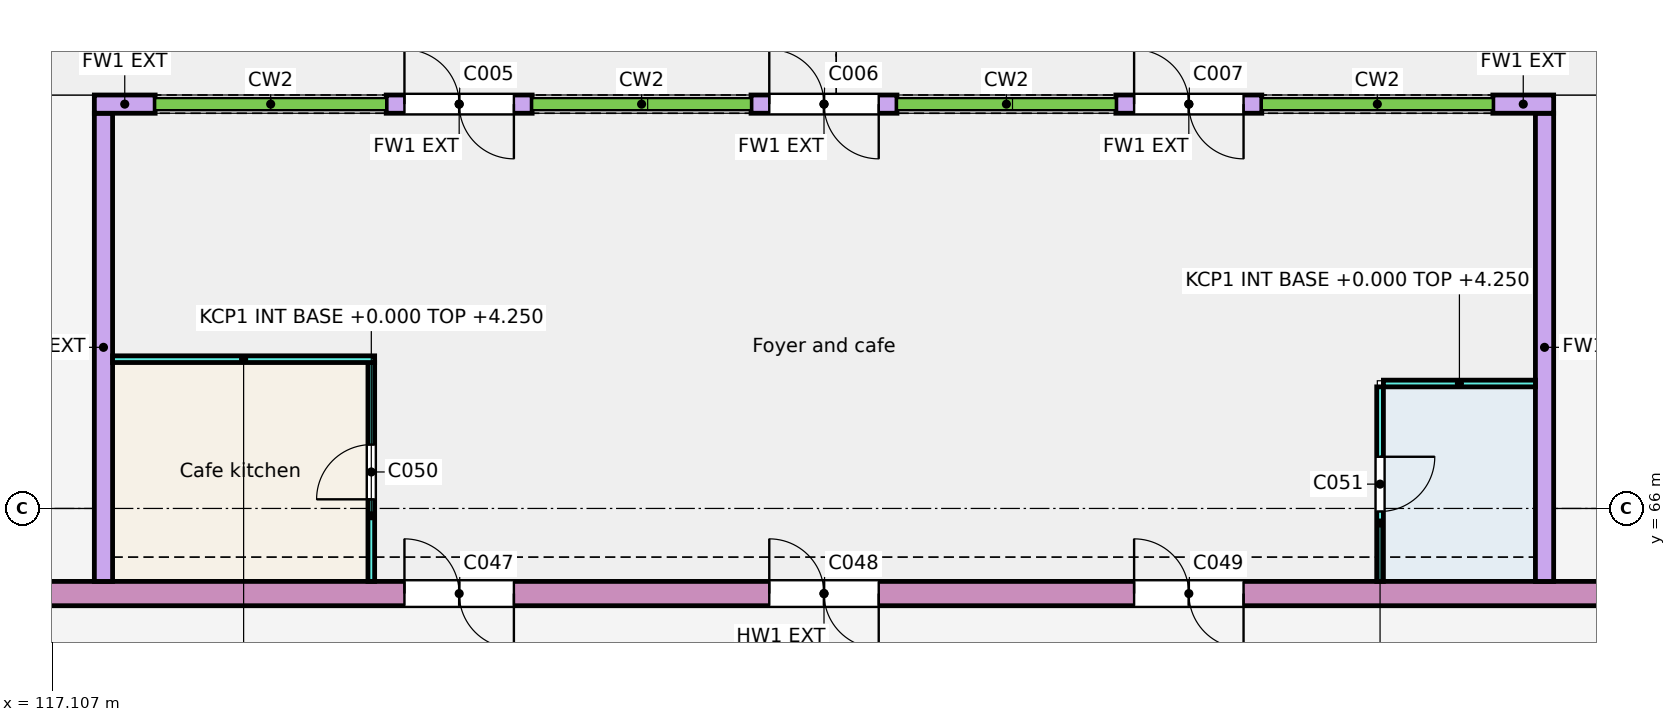
"""IFC4 building model, lengths in metres.
Left out: names, types, materials, properties, quantities, classifications, styles, units other than length and angle.
Written with IfcOpenShell. Run it as: python <this file> out.ifc"""

import sys

from ifc_helpers import new_model, si_unit, direction, frame, frame_2d, origin, place, context, subcontext, project, spatial, rectangle, extrude, element, fill, save


model = new_model("IFC4")
c1 = context("Model", 3, precision=1e-05, world=origin(), true_north=direction((0.0, 1.0)))
c2 = subcontext(c1, "Body", "Model", "MODEL_VIEW")
j1 = project(units=[si_unit("LENGTHUNIT", "METRE"), si_unit("PLANEANGLEUNIT", "RADIAN")], contexts=[c1])
p1 = place(None, origin())
s1 = spatial("IfcSite", under=j1, at=p1, CompositionType="ELEMENT")
p2 = place(p1, origin())
s2 = spatial("IfcBuilding", under=s1, at=p2, CompositionType="ELEMENT")
p3 = place(p2, origin())
s3 = spatial("IfcBuildingStorey", under=s2, at=p3, CompositionType="ELEMENT", Elevation=0.0)
p4 = place(p3, frame((114.8, 64.6, -0.25), z_axis=(0.0, 0.0, 1.0), x_axis=(1.0, 0.0, 0.0)))
e1 = element("IfcWall", 1, at=p4, inside=s3, PredefinedType="SOLIDWALL", context=c2, shape_type="SweptSolid", body=[
    extrude(rectangle(XDim=30.0, YDim=0.4, at=frame_2d((15.0, 0.0))), origin(), (0.0, 0.0, 1.0), 3.25),
])
p5 = place(p4, frame((8.1, 0.0, 0.25)))
e2 = element("IfcOpeningElement", 2, at=p5, cuts=e1, PredefinedType="OPENING", context=c2, shape_type="SweptSolid", body=[
    extrude(rectangle(XDim=1.8, YDim=2.1, at=frame_2d((0.9, 1.05))), frame((0.0, 0.21, 0.0), z_axis=(0.0, -1.0, 0.0), x_axis=(1.0, 0.0, 0.0)), (0.0, 0.0, 1.0), 0.42),
])
p6 = place(p4, frame((14.1, 0.0, 0.25)))
e3 = element("IfcOpeningElement", 3, at=p6, cuts=e1, PredefinedType="OPENING", context=c2, shape_type="SweptSolid", body=[
    extrude(rectangle(XDim=1.8, YDim=2.1, at=frame_2d((0.9, 1.05))), frame((0.0, 0.21, 0.0), z_axis=(0.0, -1.0, 0.0), x_axis=(1.0, 0.0, 0.0)), (0.0, 0.0, 1.0), 0.42),
])
p7 = place(p4, frame((20.1, 0.0, 0.25)))
e4 = element("IfcOpeningElement", 4, at=p7, cuts=e1, PredefinedType="OPENING", context=c2, shape_type="SweptSolid", body=[
    extrude(rectangle(XDim=1.8, YDim=2.1, at=frame_2d((0.9, 1.05))), frame((0.0, 0.21, 0.0), z_axis=(0.0, -1.0, 0.0), x_axis=(1.0, 0.0, 0.0)), (0.0, 0.0, 1.0), 0.42),
])
for number, where, z_axis, x_axis in (
    (5, (117.95, 64.8, -0.25), (0.0, 0.0, 1.0), (0.0, 1.0, 0.0)),
    (6, (141.65, 64.8, -0.25), (0.0, 0.0, 1.0), (0.0, 1.0, 0.0)),
):
    element("IfcWall", number, at=place(p3, frame(where, z_axis=z_axis, x_axis=x_axis)), inside=s3, PredefinedType="SOLIDWALL", context=c2, shape_type="SweptSolid", body=[
        extrude(rectangle(XDim=7.7, YDim=0.3, at=frame_2d((3.85, 0.0))), origin(), (0.0, 0.0, 1.0), 4.5),
    ])
p8 = place(p3, frame((117.8, 72.65, -0.25), z_axis=(0.0, 0.0, 1.0), x_axis=(1.0, 0.0, 0.0)))
e7 = element("IfcWall", 7, at=p8, inside=s3, PredefinedType="SOLIDWALL", context=c2, shape_type="SweptSolid", body=[
    extrude(rectangle(XDim=1.0, YDim=0.3, at=frame_2d((0.5, 0.0))), origin(), (0.0, 0.0, 1.0), 4.5),
])
p9 = place(p3, frame((122.6, 72.65, -0.25), z_axis=(0.0, 0.0, 1.0), x_axis=(1.0, 0.0, 0.0)))
e8 = element("IfcWall", 8, at=p9, inside=s3, PredefinedType="SOLIDWALL", context=c2, shape_type="SweptSolid", body=[
    extrude(rectangle(XDim=2.4, YDim=0.3, at=frame_2d((1.2, 0.0))), origin(), (0.0, 0.0, 1.0), 4.5),
])
p10 = place(p9, frame((0.3, 0.0, 0.25)))
e9 = element("IfcOpeningElement", 9, at=p10, cuts=e8, PredefinedType="OPENING", context=c2, shape_type="SweptSolid", body=[
    extrude(rectangle(XDim=1.8, YDim=2.1, at=frame_2d((0.9, 1.05))), frame((0.0, 0.16, 0.0), z_axis=(0.0, -1.0, 0.0), x_axis=(1.0, 0.0, 0.0)), (0.0, 0.0, 1.0), 0.32),
])
p11 = place(p3, frame((128.6, 72.65, -0.25), z_axis=(0.0, 0.0, 1.0), x_axis=(1.0, 0.0, 0.0)))
e10 = element("IfcWall", 10, at=p11, inside=s3, PredefinedType="SOLIDWALL", context=c2, shape_type="SweptSolid", body=[
    extrude(rectangle(XDim=2.4, YDim=0.3, at=frame_2d((1.2, 0.0))), origin(), (0.0, 0.0, 1.0), 4.5),
])
p12 = place(p11, frame((0.3, 0.0, 0.25)))
e11 = element("IfcOpeningElement", 11, at=p12, cuts=e10, PredefinedType="OPENING", context=c2, shape_type="SweptSolid", body=[
    extrude(rectangle(XDim=1.8, YDim=2.1, at=frame_2d((0.9, 1.05))), frame((0.0, 0.16, 0.0), z_axis=(0.0, -1.0, 0.0), x_axis=(1.0, 0.0, 0.0)), (0.0, 0.0, 1.0), 0.32),
])
p13 = place(p3, frame((134.6, 72.65, -0.25), z_axis=(0.0, 0.0, 1.0), x_axis=(1.0, 0.0, 0.0)))
e12 = element("IfcWall", 12, at=p13, inside=s3, PredefinedType="SOLIDWALL", context=c2, shape_type="SweptSolid", body=[
    extrude(rectangle(XDim=2.4, YDim=0.3, at=frame_2d((1.2, 0.0))), origin(), (0.0, 0.0, 1.0), 4.5),
])
p14 = place(p13, frame((0.3, 0.0, 0.25)))
e13 = element("IfcOpeningElement", 13, at=p14, cuts=e12, PredefinedType="OPENING", context=c2, shape_type="SweptSolid", body=[
    extrude(rectangle(XDim=1.8, YDim=2.1, at=frame_2d((0.9, 1.05))), frame((0.0, 0.16, 0.0), z_axis=(0.0, -1.0, 0.0), x_axis=(1.0, 0.0, 0.0)), (0.0, 0.0, 1.0), 0.32),
])
p15 = place(p3, frame((140.8, 72.65, -0.25), z_axis=(0.0, 0.0, 1.0), x_axis=(1.0, 0.0, 0.0)))
e14 = element("IfcWall", 14, at=p15, inside=s3, PredefinedType="SOLIDWALL", context=c2, shape_type="SweptSolid", body=[
    extrude(rectangle(XDim=1.0, YDim=0.3, at=frame_2d((0.5, 0.0))), origin(), (0.0, 0.0, 1.0), 4.5),
])
p16 = place(p3, frame((122.355, 64.8, 0.0), z_axis=(0.0, 0.0, 1.0), x_axis=(0.0, 1.0, 0.0)))
e15 = element("IfcWall", 15, at=p16, inside=s3, PredefinedType="PARTITIONING", context=c2, shape_type="SweptSolid", body=[
    extrude(rectangle(XDim=3.6, YDim=0.11, at=frame_2d((1.8, 0.0))), origin(), (0.0, 0.0, 1.0), 4.25),
])
p17 = place(p16, frame((1.35, 0.0, 0.0)))
e16 = element("IfcOpeningElement", 16, at=p17, cuts=e15, PredefinedType="OPENING", context=c2, shape_type="SweptSolid", body=[
    extrude(rectangle(XDim=0.9, YDim=2.1, at=frame_2d((0.45, 1.05))), frame((0.0, 0.065, 0.0), z_axis=(0.0, -1.0, 0.0), x_axis=(1.0, 0.0, 0.0)), (0.0, 0.0, 1.0), 0.13),
])
p18 = place(p3, frame((118.1, 68.455, 0.0), z_axis=(0.0, 0.0, 1.0), x_axis=(1.0, 0.0, 0.0)))
e17 = element("IfcWall", 17, at=p18, inside=s3, PredefinedType="PARTITIONING", context=c2, shape_type="SweptSolid", body=[
    extrude(rectangle(XDim=4.31, YDim=0.11, at=frame_2d((2.155, 0.0))), origin(), (0.0, 0.0, 1.0), 4.25),
])
p19 = place(p3, frame((138.945, 64.8, 0.0), z_axis=(0.0, 0.0, 1.0), x_axis=(0.0, 1.0, 0.0)))
e18 = element("IfcWall", 18, at=p19, inside=s3, PredefinedType="PARTITIONING", context=c2, shape_type="SweptSolid", body=[
    extrude(rectangle(XDim=3.2, YDim=0.11, at=frame_2d((1.6, 0.0))), origin(), (0.0, 0.0, 1.0), 4.25),
])
p20 = place(p19, frame((1.15, 0.0, 0.0)))
e19 = element("IfcOpeningElement", 19, at=p20, cuts=e18, PredefinedType="OPENING", context=c2, shape_type="SweptSolid", body=[
    extrude(rectangle(XDim=0.9, YDim=2.1, at=frame_2d((0.45, 1.05))), frame((0.0, 0.065, 0.0), z_axis=(0.0, -1.0, 0.0), x_axis=(1.0, 0.0, 0.0)), (0.0, 0.0, 1.0), 0.13),
])
p21 = place(p3, frame((139.0, 68.055, 0.0), z_axis=(0.0, 0.0, 1.0), x_axis=(1.0, 0.0, 0.0)))
e20 = element("IfcWall", 20, at=p21, inside=s3, PredefinedType="PARTITIONING", context=c2, shape_type="SweptSolid", body=[
    extrude(rectangle(XDim=2.5, YDim=0.11, at=frame_2d((1.25, 0.0))), origin(), (0.0, 0.0, 1.0), 4.25),
])
p22 = place(p10, origin())
e21 = element("IfcDoor", 21, at=p22, inside=s3, OperationType="DOUBLE_DOOR_SINGLE_SWING", PredefinedType="DOOR", context=c2, shape_type="SweptSolid", body=[
    extrude(rectangle(XDim=1.8, YDim=2.1, at=frame_2d((0.9, 1.05))), frame((0.0, 0.025, 0.0), z_axis=(0.0, -1.0, 0.0), x_axis=(1.0, 0.0, 0.0)), (0.0, 0.0, 1.0), 0.05),
])
fill(e9, e21)
p23 = place(p12, origin())
e22 = element("IfcDoor", 22, at=p23, inside=s3, OperationType="DOUBLE_DOOR_SINGLE_SWING", PredefinedType="DOOR", context=c2, shape_type="SweptSolid", body=[
    extrude(rectangle(XDim=1.8, YDim=2.1, at=frame_2d((0.9, 1.05))), frame((0.0, 0.025, 0.0), z_axis=(0.0, -1.0, 0.0), x_axis=(1.0, 0.0, 0.0)), (0.0, 0.0, 1.0), 0.05),
])
fill(e11, e22)
p24 = place(p14, origin())
e23 = element("IfcDoor", 23, at=p24, inside=s3, OperationType="DOUBLE_DOOR_SINGLE_SWING", PredefinedType="DOOR", context=c2, shape_type="SweptSolid", body=[
    extrude(rectangle(XDim=1.8, YDim=2.1, at=frame_2d((0.9, 1.05))), frame((0.0, 0.025, 0.0), z_axis=(0.0, -1.0, 0.0), x_axis=(1.0, 0.0, 0.0)), (0.0, 0.0, 1.0), 0.05),
])
fill(e13, e23)
p25 = place(p5, origin())
e24 = element("IfcDoor", 24, at=p25, inside=s3, OperationType="DOUBLE_DOOR_SINGLE_SWING", PredefinedType="DOOR", context=c2, shape_type="SweptSolid", body=[
    extrude(rectangle(XDim=1.8, YDim=2.1, at=frame_2d((0.9, 1.05))), frame((0.0, 0.025, 0.0), z_axis=(0.0, -1.0, 0.0), x_axis=(1.0, 0.0, 0.0)), (0.0, 0.0, 1.0), 0.05),
])
fill(e2, e24)
p26 = place(p6, origin())
e25 = element("IfcDoor", 25, at=p26, inside=s3, OperationType="DOUBLE_DOOR_SINGLE_SWING", PredefinedType="DOOR", context=c2, shape_type="SweptSolid", body=[
    extrude(rectangle(XDim=1.8, YDim=2.1, at=frame_2d((0.9, 1.05))), frame((0.0, 0.025, 0.0), z_axis=(0.0, -1.0, 0.0), x_axis=(1.0, 0.0, 0.0)), (0.0, 0.0, 1.0), 0.05),
])
fill(e3, e25)
p27 = place(p7, origin())
e26 = element("IfcDoor", 26, at=p27, inside=s3, OperationType="DOUBLE_DOOR_SINGLE_SWING", PredefinedType="DOOR", context=c2, shape_type="SweptSolid", body=[
    extrude(rectangle(XDim=1.8, YDim=2.1, at=frame_2d((0.9, 1.05))), frame((0.0, 0.025, 0.0), z_axis=(0.0, -1.0, 0.0), x_axis=(1.0, 0.0, 0.0)), (0.0, 0.0, 1.0), 0.05),
])
fill(e4, e26)
p28 = place(p17, origin())
e27 = element("IfcDoor", 27, at=p28, inside=s3, OperationType="SINGLE_SWING_LEFT", PredefinedType="DOOR", context=c2, shape_type="SweptSolid", body=[
    extrude(rectangle(XDim=0.9, YDim=2.1, at=frame_2d((0.45, 1.05))), frame((0.0, 0.025, 0.0), z_axis=(0.0, -1.0, 0.0), x_axis=(1.0, 0.0, 0.0)), (0.0, 0.0, 1.0), 0.05),
])
fill(e16, e27)
p29 = place(p20, origin())
e28 = element("IfcDoor", 28, at=p29, inside=s3, OperationType="SINGLE_SWING_RIGHT", PredefinedType="DOOR", context=c2, shape_type="SweptSolid", body=[
    extrude(rectangle(XDim=0.9, YDim=2.1, at=frame_2d((0.45, 1.05))), frame((0.0, 0.025, 0.0), z_axis=(0.0, -1.0, 0.0), x_axis=(1.0, 0.0, 0.0)), (0.0, 0.0, 1.0), 0.05),
])
fill(e19, e28)
save(model, sys.argv[1])
